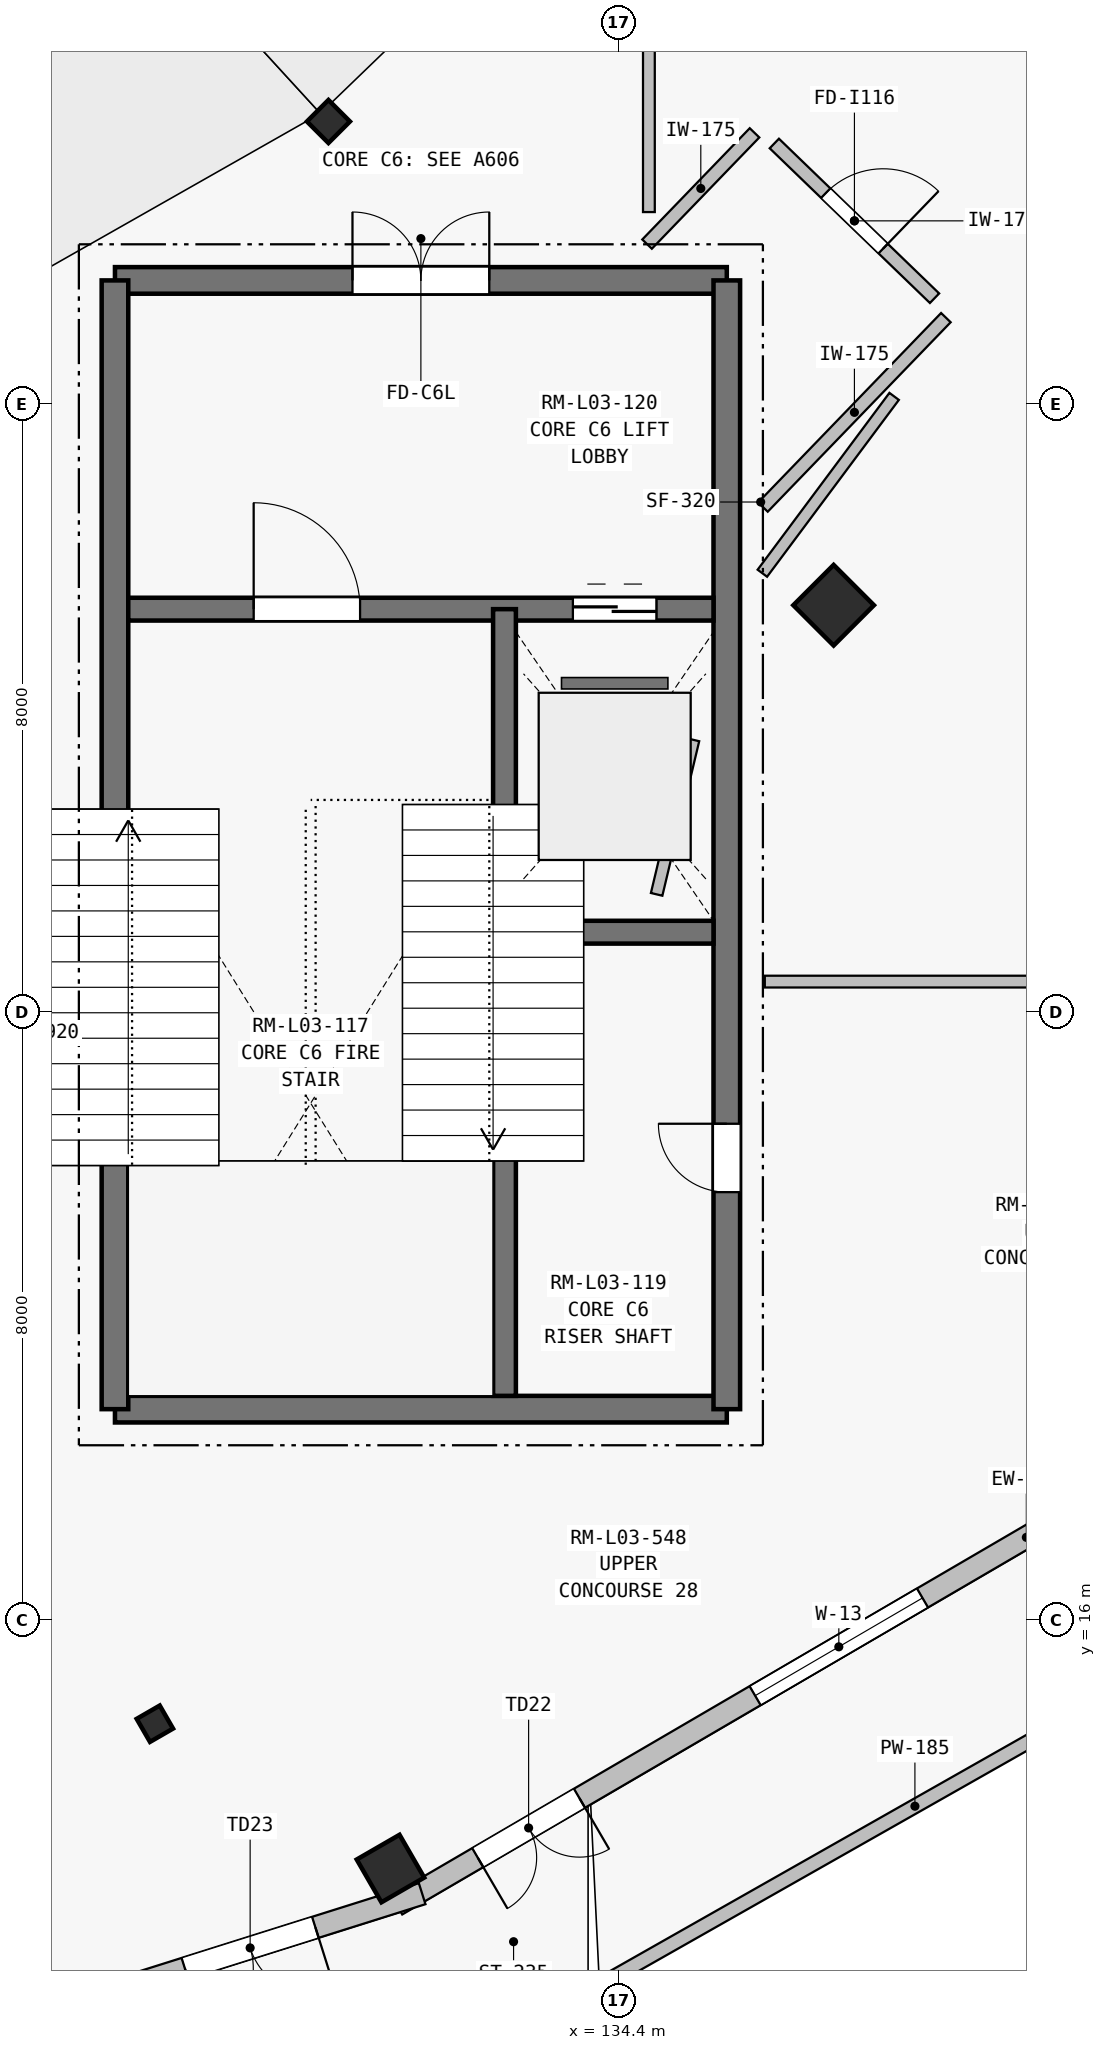
"""IFC4 building model, lengths in metres.
Left out: names, types, materials, properties, quantities, classifications, styles, units other than length and angle.
Written with IfcOpenShell. Run it as: python <this file> out.ifc"""

import sys

from ifc_helpers import new_model, si_unit, direction, frame, frame_2d, origin, origin_2d, place, context, subcontext, project, spatial, rectangle, i_section, extrude, element, fill, save


model = new_model("IFC4")
c1 = context("Model", 3, precision=1e-05, world=origin(), true_north=direction((0.0, 1.0)))
c2 = subcontext(c1, "Body", "Model", "MODEL_VIEW")
j1 = project(units=[si_unit("LENGTHUNIT", "METRE"), si_unit("PLANEANGLEUNIT", "RADIAN")], contexts=[c1])
p1 = place(None, origin())
s1 = spatial("IfcSite", under=j1, at=p1, CompositionType="ELEMENT")
p2 = place(p1, origin())
s2 = spatial("IfcBuilding", under=s1, at=p2, CompositionType="ELEMENT")
p3 = place(p2, frame((0.0, 0.0, 14.4)))
s3 = spatial("IfcBuildingStorey", under=s2, at=p3, CompositionType="ELEMENT", Elevation=14.4)
p4 = place(p3, frame((130.584, 35.716, 0.0), z_axis=(0.0, 0.0, 1.0), x_axis=(0.707106781187, -0.707106781187, 0.0)))
e1 = element("IfcColumn", 1, at=p4, inside=s3, PredefinedType="COLUMN", context=c2, shape_type="SweptSolid", body=[
    extrude(i_section(OverallWidth=0.4, OverallDepth=0.4, WebThickness=0.016, FlangeThickness=0.028, at=origin_2d()), origin(), (0.0, 0.0, 1.0), 4.5),
])
p5 = place(p3, frame((137.231, 29.352, 0.0), z_axis=(0.0, 0.0, 1.0), x_axis=(0.707106781187, -0.707106781187, 0.0)))
e2 = element("IfcColumn", 2, at=p5, inside=s3, PredefinedType="COLUMN", context=c2, shape_type="SweptSolid", body=[
    extrude(rectangle(XDim=0.75, YDim=0.75, at=origin_2d()), origin(), (0.0, 0.0, 1.0), 4.5),
])
p6 = place(p3, frame((128.3, 14.637, 0.0), z_axis=(0.0, 0.0, 1.0), x_axis=(0.5, -0.866025403784, 0.0)))
e3 = element("IfcColumn", 3, at=p6, inside=s3, PredefinedType="COLUMN", context=c2, shape_type="SweptSolid", body=[
    extrude(i_section(OverallWidth=0.35, OverallDepth=0.35, WebThickness=0.014, FlangeThickness=0.024, at=origin_2d()), origin(), (0.0, 0.0, 1.0), 4.5),
])
p7 = place(p3, frame((131.4, 12.731, 0.0), z_axis=(0.0, 0.0, 1.0), x_axis=(0.5, -0.866025403784, 0.0)))
e4 = element("IfcColumn", 4, at=p7, inside=s3, PredefinedType="COLUMN", context=c2, shape_type="SweptSolid", body=[
    extrude(rectangle(XDim=0.65, YDim=0.65, at=origin_2d()), origin(), (0.0, 0.0, 1.0), 4.26),
])
p8 = place(p3, frame((148.051, 21.925, 0.0), z_axis=(0.0, 0.0, 1.0), x_axis=(-0.863607623942, -0.504164528572, 0.0)))
e5 = element("IfcWall", 5, at=p8, inside=s3, PredefinedType="SOLIDWALL", context=c2, shape_type="SweptSolid", body=[
    extrude(rectangle(XDim=19.186, YDim=0.29, at=frame_2d((9.593, 0.0))), origin(), (0.0, 0.0, 1.0), 4.26),
])
p9 = place(p8, frame((16.401, 0.0, 0.0)))
e6 = element("IfcOpeningElement", 6, at=p9, cuts=e5, PredefinedType="OPENING", context=c2, shape_type="SweptSolid", body=[
    extrude(rectangle(XDim=1.55, YDim=2.3, at=frame_2d((0.775, 1.15))), frame((0.0, 0.155, 0.0), z_axis=(0.0, -1.0, 0.0), x_axis=(1.0, 0.0, 0.0)), (0.0, 0.0, 1.0), 0.31),
])
p10 = place(p8, frame((2.275, 0.0, 0.9)))
e7 = element("IfcOpeningElement", 7, at=p10, cuts=e5, PredefinedType="OPENING", context=c2, shape_type="SweptSolid", body=[
    extrude(rectangle(XDim=1.95, YDim=2.0, at=frame_2d((0.975, 1.0))), frame((0.0, 0.155, 0.0), z_axis=(0.0, -1.0, 0.0), x_axis=(1.0, 0.0, 0.0)), (0.0, 0.0, 1.0), 0.31),
])
p11 = place(p8, frame((6.425, 0.0, 0.9)))
e8 = element("IfcOpeningElement", 8, at=p11, cuts=e5, PredefinedType="OPENING", context=c2, shape_type="SweptSolid", body=[
    extrude(rectangle(XDim=2.85, YDim=1.6, at=frame_2d((1.425, 0.8))), frame((0.0, 0.155, 0.0), z_axis=(0.0, -1.0, 0.0), x_axis=(1.0, 0.0, 0.0)), (0.0, 0.0, 1.0), 0.31),
])
p12 = place(p8, frame((11.175, 0.0, 0.9)))
e9 = element("IfcOpeningElement", 9, at=p12, cuts=e5, PredefinedType="OPENING", context=c2, shape_type="SweptSolid", body=[
    extrude(rectangle(XDim=2.55, YDim=1.55, at=frame_2d((1.275, 0.775))), frame((0.0, 0.155, 0.0), z_axis=(0.0, -1.0, 0.0), x_axis=(1.0, 0.0, 0.0)), (0.0, 0.0, 1.0), 0.31),
])
p13 = place(p3, frame((131.817, 12.401, 0.0), z_axis=(0.0, 0.0, 1.0), x_axis=(-0.953756113153, -0.30058156401, 0.0)))
e10 = element("IfcWall", 10, at=p13, inside=s3, PredefinedType="SOLIDWALL", context=c2, shape_type="SweptSolid", body=[
    extrude(rectangle(XDim=20.212, YDim=0.29, at=frame_2d((10.106, 0.0))), origin(), (0.0, 0.0, 1.0), 4.26),
])
p14 = place(p13, frame((1.473, 0.0, 0.0)))
e11 = element("IfcOpeningElement", 11, at=p14, cuts=e10, PredefinedType="OPENING", context=c2, shape_type="SweptSolid", body=[
    extrude(rectangle(XDim=1.8, YDim=2.35, at=frame_2d((0.9, 1.175))), frame((0.0, 0.155, 0.0), z_axis=(0.0, -1.0, 0.0), x_axis=(1.0, 0.0, 0.0)), (0.0, 0.0, 1.0), 0.31),
])
p15 = place(p13, frame((6.575, 0.0, 0.9)))
e12 = element("IfcOpeningElement", 12, at=p15, cuts=e10, PredefinedType="OPENING", context=c2, shape_type="SweptSolid", body=[
    extrude(rectangle(XDim=2.55, YDim=1.55, at=frame_2d((1.275, 0.775))), frame((0.0, 0.155, 0.0), z_axis=(0.0, -1.0, 0.0), x_axis=(1.0, 0.0, 0.0)), (0.0, 0.0, 1.0), 0.31),
])
p16 = place(p13, frame((11.225, 0.0, 0.9)))
e13 = element("IfcOpeningElement", 13, at=p16, cuts=e10, PredefinedType="OPENING", context=c2, shape_type="SweptSolid", body=[
    extrude(rectangle(XDim=2.45, YDim=1.35, at=frame_2d((1.225, 0.675))), frame((0.0, 0.155, 0.0), z_axis=(0.0, -1.0, 0.0), x_axis=(1.0, 0.0, 0.0)), (0.0, 0.0, 1.0), 0.31),
])
p17 = place(p13, frame((16.575, 0.0, 0.75)))
e14 = element("IfcOpeningElement", 14, at=p17, cuts=e10, PredefinedType="OPENING", context=c2, shape_type="SweptSolid", body=[
    extrude(rectangle(XDim=0.95, YDim=2.2, at=frame_2d((0.475, 1.1))), frame((0.0, 0.155, 0.0), z_axis=(0.0, -1.0, 0.0), x_axis=(1.0, 0.0, 0.0)), (0.0, 0.0, 1.0), 0.31),
])
p18 = place(p3, frame((142.8, 16.104, 0.0), z_axis=(0.0, 0.0, 1.0), x_axis=(-0.869846022988, -0.493323318213, 0.0)))
e15 = element("IfcWall", 15, at=p18, inside=s3, PredefinedType="PARAPET", context=c2, shape_type="SweptSolid", body=[
    extrude(rectangle(XDim=10.347, YDim=0.185, at=frame_2d((5.173, 0.0))), origin(), (0.0, 0.0, 1.0), 0.85),
])
p19 = place(p3, frame((127.775, 18.775, 0.0), z_axis=(0.0, 0.0, 1.0), x_axis=(1.0, 0.0, 0.0)))
e16 = element("IfcWall", 16, at=p19, inside=s3, PredefinedType="SHEAR", context=c2, shape_type="SweptSolid", body=[
    extrude(rectangle(XDim=8.05, YDim=0.35, at=frame_2d((4.025, 0.0))), origin(), (0.0, 0.0, 1.0), 4.5),
])
p20 = place(p3, frame((127.775, 33.625, 0.0), z_axis=(0.0, 0.0, 1.0), x_axis=(1.0, 0.0, 0.0)))
e17 = element("IfcWall", 17, at=p20, inside=s3, PredefinedType="SHEAR", context=c2, shape_type="SweptSolid", body=[
    extrude(rectangle(XDim=8.05, YDim=0.35, at=frame_2d((4.025, 0.0))), origin(), (0.0, 0.0, 1.0), 4.5),
])
p21 = place(p20, frame((3.125, 0.0, 0.0)))
e18 = element("IfcOpeningElement", 18, at=p21, cuts=e17, PredefinedType="OPENING", context=c2, shape_type="SweptSolid", body=[
    extrude(rectangle(XDim=1.8, YDim=2.25, at=frame_2d((0.9, 1.125))), frame((0.0, 0.185, 0.0), z_axis=(0.0, -1.0, 0.0), x_axis=(1.0, 0.0, 0.0)), (0.0, 0.0, 1.0), 0.37),
])
p22 = place(p3, frame((127.775, 18.775, 0.0), z_axis=(0.0, 0.0, 1.0), x_axis=(0.0, 1.0, 0.0)))
e19 = element("IfcWall", 19, at=p22, inside=s3, PredefinedType="SHEAR", context=c2, shape_type="SweptSolid", body=[
    extrude(rectangle(XDim=14.85, YDim=0.35, at=frame_2d((7.425, 0.0))), origin(), (0.0, 0.0, 1.0), 4.5),
])
p23 = place(p3, frame((135.825, 18.775, 0.0), z_axis=(0.0, 0.0, 1.0), x_axis=(0.0, 1.0, 0.0)))
e20 = element("IfcWall", 20, at=p23, inside=s3, PredefinedType="SHEAR", context=c2, shape_type="SweptSolid", body=[
    extrude(rectangle(XDim=14.85, YDim=0.35, at=frame_2d((7.425, 0.0))), origin(), (0.0, 0.0, 1.0), 4.5),
])
p24 = place(p23, frame((2.855, 0.0, 0.0)))
e21 = element("IfcOpeningElement", 21, at=p24, cuts=e20, PredefinedType="OPENING", context=c2, shape_type="SweptSolid", body=[
    extrude(rectangle(XDim=0.9, YDim=2.1, at=frame_2d((0.45, 1.05))), frame((0.0, 0.185, 0.0), z_axis=(0.0, -1.0, 0.0), x_axis=(1.0, 0.0, 0.0)), (0.0, 0.0, 1.0), 0.37),
])
p25 = place(p3, frame((127.95, 29.3, 0.0), z_axis=(0.0, 0.0, 1.0), x_axis=(1.0, 0.0, 0.0)))
e22 = element("IfcWall", 22, at=p25, inside=s3, PredefinedType="SHEAR", context=c2, shape_type="SweptSolid", body=[
    extrude(rectangle(XDim=7.7, YDim=0.3, at=frame_2d((3.85, 0.0))), origin(), (0.0, 0.0, 1.0), 4.5),
])
p26 = place(p25, frame((1.65, 0.0, 0.0)))
e23 = element("IfcOpeningElement", 23, at=p26, cuts=e22, PredefinedType="OPENING", context=c2, shape_type="SweptSolid", body=[
    extrude(rectangle(XDim=1.4, YDim=2.2, at=frame_2d((0.7, 1.1))), frame((0.0, 0.16, 0.0), z_axis=(0.0, -1.0, 0.0), x_axis=(1.0, 0.0, 0.0)), (0.0, 0.0, 1.0), 0.32),
])
p27 = place(p25, frame((5.85, 0.0, 0.0)))
e24 = element("IfcOpeningElement", 24, at=p27, cuts=e22, PredefinedType="OPENING", context=c2, shape_type="SweptSolid", body=[
    extrude(rectangle(XDim=1.1, YDim=2.2, at=frame_2d((0.55, 1.1))), frame((0.0, 0.16, 0.0), z_axis=(0.0, -1.0, 0.0), x_axis=(1.0, 0.0, 0.0)), (0.0, 0.0, 1.0), 0.32),
])
p28 = place(p3, frame((132.9, 18.95, 0.0), z_axis=(0.0, 0.0, 1.0), x_axis=(0.0, 1.0, 0.0)))
e25 = element("IfcWall", 25, at=p28, inside=s3, PredefinedType="SHEAR", context=c2, shape_type="SweptSolid", body=[
    extrude(rectangle(XDim=10.35, YDim=0.3, at=frame_2d((5.175, 0.0))), origin(), (0.0, 0.0, 1.0), 4.5),
])
p29 = place(p3, frame((133.05, 25.05, 0.0), z_axis=(0.0, 0.0, 1.0), x_axis=(1.0, 0.0, 0.0)))
e26 = element("IfcWall", 26, at=p29, inside=s3, PredefinedType="SHEAR", context=c2, shape_type="SweptSolid", body=[
    extrude(rectangle(XDim=2.6, YDim=0.3, at=frame_2d((1.3, 0.0))), origin(), (0.0, 0.0, 1.0), 4.5),
])
p30 = place(p3, frame((138.708, 33.135, 0.0), z_axis=(0.0, 0.0, 1.0), x_axis=(-0.694668699346, -0.719329825705, 0.0)))
e27 = element("IfcWall", 27, at=p30, inside=s3, PredefinedType="PARTITIONING", context=c2, shape_type="SweptSolid", body=[
    extrude(rectangle(XDim=3.465, YDim=0.175, at=frame_2d((1.732, 0.0))), origin(), (0.0, 0.0, 1.0), 4.18),
])
p31 = place(p3, frame((134.776, 34.103, 0.0), z_axis=(0.0, 0.0, 1.0), x_axis=(0.694643747877, 0.719353920915, 0.0)))
e28 = element("IfcWall", 28, at=p31, inside=s3, PredefinedType="PARTITIONING", context=c2, shape_type="SweptSolid", body=[
    extrude(rectangle(XDim=2.035, YDim=0.175, at=frame_2d((1.018, 0.0))), origin(), (0.0, 0.0, 1.0), 4.18),
])
p32 = place(p3, frame((136.45, 35.426, 0.0), z_axis=(0.0, 0.0, 1.0), x_axis=(0.7193296789, -0.694668851363, 0.0)))
e29 = element("IfcWall", 29, at=p32, inside=s3, PredefinedType="PARTITIONING", context=c2, shape_type="SweptSolid", body=[
    extrude(rectangle(XDim=2.93, YDim=0.175, at=frame_2d((1.465, 0.0))), origin(), (0.0, 0.0, 1.0), 3.851),
])
p33 = place(p32, frame((0.94, 0.0, 0.0)))
e30 = element("IfcOpeningElement", 30, at=p33, cuts=e29, PredefinedType="OPENING", context=c2, shape_type="SweptSolid", body=[
    extrude(rectangle(XDim=1.05, YDim=2.25, at=frame_2d((0.525, 1.125))), frame((0.0, 0.097, 0.0), z_axis=(0.0, -1.0, 0.0), x_axis=(1.0, 0.0, 0.0)), (0.0, 0.0, 1.0), 0.195),
])
p34 = place(p3, frame((134.902, 25.548, 0.0), z_axis=(0.0, 0.0, 1.0), x_axis=(0.231910088132, 0.972737226091, 0.0)))
e31 = element("IfcWall", 31, at=p34, inside=s3, PredefinedType="PARTITIONING", context=c2, shape_type="SweptSolid", body=[
    extrude(rectangle(XDim=2.09, YDim=0.155, at=frame_2d((1.045, 0.0))), origin(), (0.0, 0.0, 1.0), 4.2),
])
p35 = place(p3, frame((136.293, 29.773, 0.0), z_axis=(0.0, 0.0, 1.0), x_axis=(0.597587406811, 0.801803773514, 0.0)))
e32 = element("IfcWall", 32, at=p35, inside=s3, PredefinedType="PARTITIONING", context=c2, shape_type="SweptSolid", body=[
    extrude(rectangle(XDim=2.901, YDim=0.155, at=frame_2d((1.451, 0.0))), origin(), (0.0, 0.0, 1.0), 3.695),
])
p36 = place(p3, frame((134.8, 34.524, 0.0), z_axis=(0.0, 0.0, 1.0), x_axis=(0.0, 1.0, 0.0)))
e33 = element("IfcWall", 33, at=p36, inside=s3, PredefinedType="PARTITIONING", context=c2, shape_type="SweptSolid", body=[
    extrude(rectangle(XDim=9.396, YDim=0.155, at=frame_2d((4.698, 0.0))), origin(), (0.0, 0.0, 1.0), 2.943),
])
p37 = place(p3, frame((149.762, 24.4, 0.0), z_axis=(0.0, 0.0, 1.0), x_axis=(-1.0, 0.0, 0.0)))
e34 = element("IfcWall", 34, at=p37, inside=s3, PredefinedType="PARTITIONING", context=c2, shape_type="SweptSolid", body=[
    extrude(rectangle(XDim=13.437, YDim=0.155, at=frame_2d((6.718, 0.0))), origin(), (0.0, 0.0, 1.0), 3.543),
])
p38 = place(p37, frame((3.0, 0.0, 0.0)))
e35 = element("IfcOpeningElement", 35, at=p38, cuts=e34, PredefinedType="OPENING", context=c2, shape_type="SweptSolid", body=[
    extrude(rectangle(XDim=1.9, YDim=2.35, at=frame_2d((0.95, 1.175))), frame((0.0, 0.087, 0.0), z_axis=(0.0, -1.0, 0.0), x_axis=(1.0, 0.0, 0.0)), (0.0, 0.0, 1.0), 0.175),
])
p39 = place(p9, origin())
e36 = element("IfcDoor", 36, at=p39, inside=s3, OperationType="DOUBLE_DOOR_SINGLE_SWING", PredefinedType="DOOR", context=c2, shape_type="SweptSolid", body=[
    extrude(rectangle(XDim=1.55, YDim=2.3, at=frame_2d((0.775, 1.15))), frame((0.0, 0.025, 0.0), z_axis=(0.0, -1.0, 0.0), x_axis=(1.0, 0.0, 0.0)), (0.0, 0.0, 1.0), 0.05),
])
fill(e6, e36)
p40 = place(p14, origin())
e37 = element("IfcDoor", 37, at=p40, inside=s3, OperationType="DOUBLE_DOOR_SINGLE_SWING", PredefinedType="DOOR", context=c2, shape_type="SweptSolid", body=[
    extrude(rectangle(XDim=1.8, YDim=2.35, at=frame_2d((0.9, 1.175))), frame((0.0, 0.025, 0.0), z_axis=(0.0, -1.0, 0.0), x_axis=(1.0, 0.0, 0.0)), (0.0, 0.0, 1.0), 0.05),
])
fill(e11, e37)
p41 = place(p12, origin())
e38 = element("IfcWindow", 38, at=p41, inside=s3, PartitioningType="SINGLE_PANEL", PredefinedType="WINDOW", context=c2, shape_type="SweptSolid", body=[
    extrude(rectangle(XDim=2.55, YDim=1.55, at=frame_2d((1.275, 0.775))), frame((0.0, 0.03, 0.0), z_axis=(0.0, -1.0, 0.0), x_axis=(1.0, 0.0, 0.0)), (0.0, 0.0, 1.0), 0.06),
])
fill(e9, e38)
p42 = place(p21, origin())
e39 = element("IfcDoor", 39, at=p42, inside=s3, OperationType="DOUBLE_DOOR_SINGLE_SWING", PredefinedType="DOOR", context=c2, shape_type="SweptSolid", body=[
    extrude(rectangle(XDim=1.8, YDim=2.25, at=frame_2d((0.9, 1.125))), frame((0.0, 0.025, 0.0), z_axis=(0.0, -1.0, 0.0), x_axis=(1.0, 0.0, 0.0)), (0.0, 0.0, 1.0), 0.05),
])
fill(e18, e39)
p43 = place(p26, origin())
e40 = element("IfcDoor", 40, at=p43, inside=s3, OperationType="SINGLE_SWING_LEFT", PredefinedType="DOOR", context=c2, shape_type="SweptSolid", body=[
    extrude(rectangle(XDim=1.4, YDim=2.2, at=frame_2d((0.7, 1.1))), frame((0.0, 0.025, 0.0), z_axis=(0.0, -1.0, 0.0), x_axis=(1.0, 0.0, 0.0)), (0.0, 0.0, 1.0), 0.05),
])
fill(e23, e40)
p44 = place(p24, origin())
e41 = element("IfcDoor", 41, at=p44, inside=s3, OperationType="SINGLE_SWING_RIGHT", PredefinedType="DOOR", context=c2, shape_type="SweptSolid", body=[
    extrude(rectangle(XDim=0.9, YDim=2.1, at=frame_2d((0.45, 1.05))), frame((0.0, 0.025, 0.0), z_axis=(0.0, -1.0, 0.0), x_axis=(1.0, 0.0, 0.0)), (0.0, 0.0, 1.0), 0.05),
])
fill(e21, e41)
p45 = place(p27, origin())
e42 = element("IfcDoor", 42, at=p45, inside=s3, OperationType="SLIDING_TO_LEFT", PredefinedType="DOOR", context=c2, shape_type="SweptSolid", body=[
    extrude(rectangle(XDim=1.1, YDim=2.2, at=frame_2d((0.55, 1.1))), frame((0.0, 0.025, 0.0), z_axis=(0.0, -1.0, 0.0), x_axis=(1.0, 0.0, 0.0)), (0.0, 0.0, 1.0), 0.05),
])
fill(e24, e42)
p46 = place(p33, origin())
e43 = element("IfcDoor", 43, at=p46, inside=s3, OperationType="SINGLE_SWING_RIGHT", PredefinedType="DOOR", context=c2, shape_type="SweptSolid", body=[
    extrude(rectangle(XDim=1.05, YDim=2.25, at=frame_2d((0.525, 1.125))), frame((0.0, 0.025, 0.0), z_axis=(0.0, -1.0, 0.0), x_axis=(1.0, 0.0, 0.0)), (0.0, 0.0, 1.0), 0.05),
])
fill(e30, e43)
save(model, sys.argv[1])
